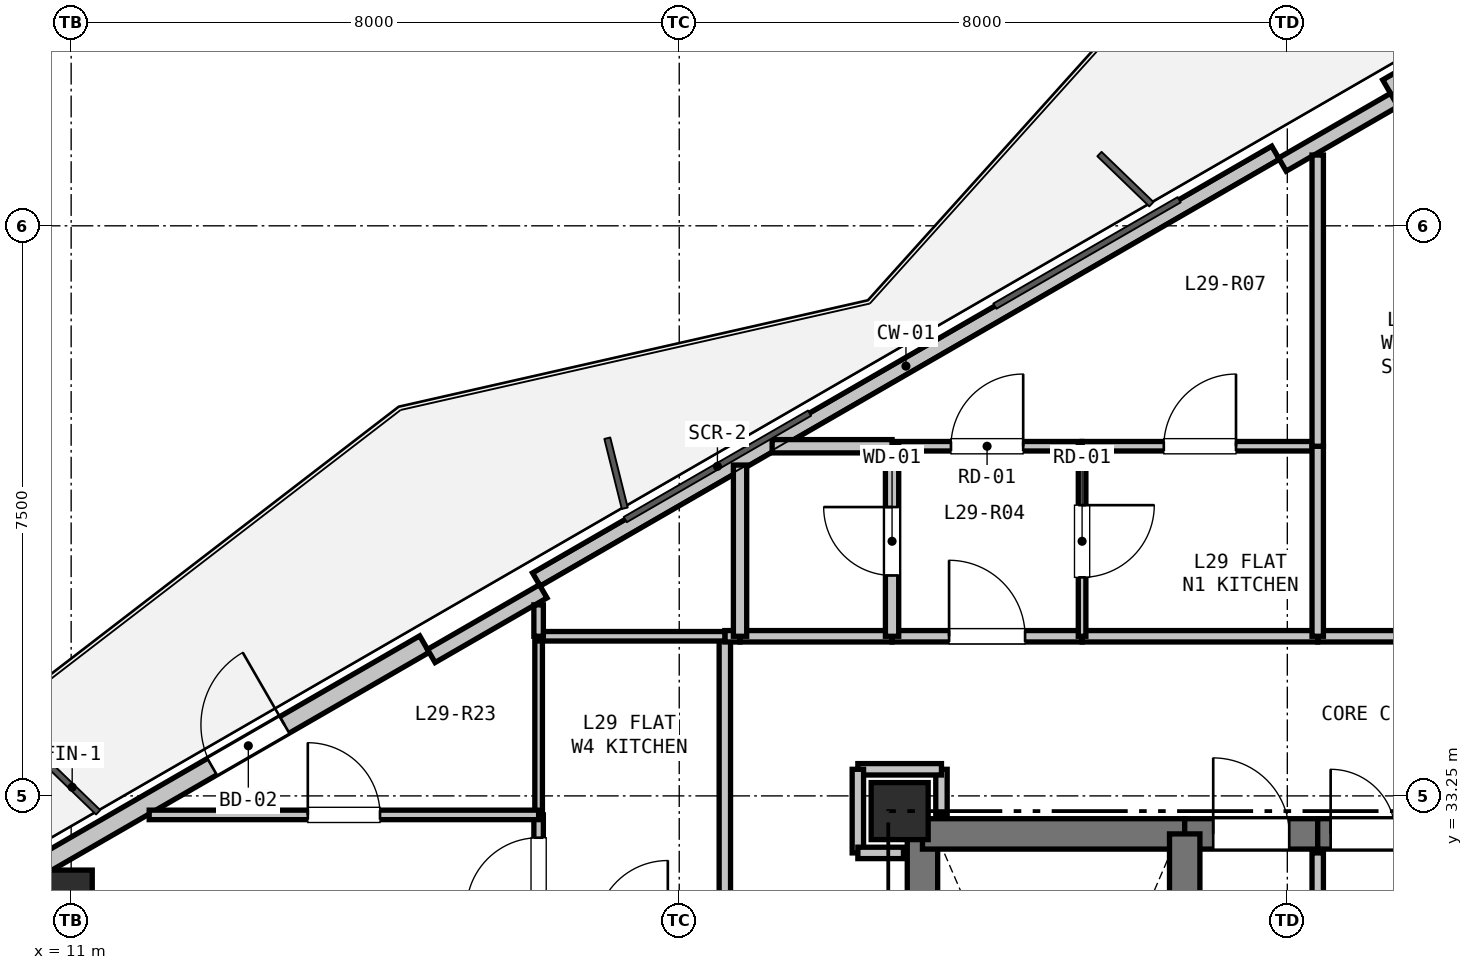
"""IFC4 building model, lengths in metres.
Left out: names, types, materials, properties, quantities, classifications, styles, units other than length and angle.
Written with IfcOpenShell. Run it as: python <this file> out.ifc"""

import sys

from ifc_helpers import new_model, si_unit, direction, frame, frame_2d, origin, origin_2d, place, context, subcontext, project, spatial, rectangle, hollow_rectangle, extrude, element, fill, save


model = new_model("IFC4")
c1 = context("Model", 3, precision=1e-05, world=origin(), true_north=direction((0.0, 1.0)))
c2 = subcontext(c1, "Body", "Model", "MODEL_VIEW")
j1 = project(units=[si_unit("LENGTHUNIT", "METRE"), si_unit("PLANEANGLEUNIT", "RADIAN")], contexts=[c1])
p1 = place(None, origin())
s1 = spatial("IfcSite", under=j1, at=p1, CompositionType="ELEMENT")
p2 = place(p1, origin())
s2 = spatial("IfcBuilding", under=s1, at=p2, CompositionType="ELEMENT")
p3 = place(p2, frame((0.0, 0.0, 106.5)))
s3 = spatial("IfcBuildingStorey", under=s2, at=p3, CompositionType="ELEMENT", Elevation=106.5)
p4 = place(p3, frame((21.9, 33.05, 0.0), z_axis=(0.0, 0.0, 1.0), x_axis=(1.0, 0.0, 0.0)))
e1 = element("IfcColumn", 1, at=p4, inside=s3, PredefinedType="COLUMN", context=c2, shape_type="SweptSolid", body=[
    extrude(rectangle(XDim=0.75, YDim=0.75, at=origin_2d()), origin(), (0.0, 0.0, 1.0), 3.3),
])
p5 = place(p3, frame((10.702, 31.699, 0.0), z_axis=(0.0, 0.0, 1.0), x_axis=(1.0, 0.0, 0.0)))
e2 = element("IfcColumn", 2, at=p5, inside=s3, PredefinedType="COLUMN", context=c2, shape_type="SweptSolid", body=[
    extrude(hollow_rectangle(XDim=1.15, YDim=1.15, WallThickness=0.032, at=origin_2d()), origin(), (0.0, 0.0, 1.0), 3.3),
])
p6 = place(p3, frame((5.317, 29.282, 0.0), z_axis=(0.0, 0.0, 1.0), x_axis=(0.866023023012, 0.500004123596, 0.0)))
e3 = element("IfcWall", 3, at=p6, inside=s3, PredefinedType="SOLIDWALL", context=c2, shape_type="SweptSolid", body=[
    extrude(rectangle(XDim=11.93, YDim=0.25, at=frame_2d((5.965, 0.0))), origin(), (0.0, 0.0, 1.0), 2.67),
])
p7 = place(p6, frame((8.704, 0.0, 0.0)))
e4 = element("IfcOpeningElement", 4, at=p7, cuts=e3, PredefinedType="OPENING", context=c2, shape_type="SweptSolid", body=[
    extrude(rectangle(XDim=1.1, YDim=2.1, at=frame_2d((0.55, 1.05))), frame((0.0, 0.135, 0.0), z_axis=(0.0, -1.0, 0.0), x_axis=(1.0, 0.0, 0.0)), (0.0, 0.0, 1.0), 0.27),
])
p8 = place(p3, frame((17.12, 36.097, 0.0), z_axis=(0.0, 0.0, 1.0), x_axis=(0.866027010039, 0.499997217876, 0.0)))
e5 = element("IfcWall", 5, at=p8, inside=s3, PredefinedType="PARAPET", context=c2, shape_type="SweptSolid", body=[
    extrude(rectangle(XDim=11.229, YDim=0.2, at=frame_2d((5.615, 0.0))), origin(), (0.0, 0.0, 1.0), 0.2),
])
p9 = place(p3, frame((28.317, 42.562, 0.0), z_axis=(0.0, 0.0, 1.0), x_axis=(0.866023023012, 0.500004123596, 0.0)))
e6 = element("IfcWall", 6, at=p9, inside=s3, PredefinedType="SOLIDWALL", context=c2, shape_type="SweptSolid", body=[
    extrude(rectangle(XDim=11.93, YDim=0.25, at=frame_2d((5.965, 0.0))), origin(), (0.0, 0.0, 1.0), 2.67),
])
p10 = place(p9, frame((6.718, 0.0, 0.9)))
e7 = element("IfcOpeningElement", 7, at=p10, cuts=e6, PredefinedType="OPENING", context=c2, shape_type="SweptSolid", body=[
    extrude(rectangle(XDim=1.2, YDim=1.4, at=frame_2d((0.6, 0.7))), frame((0.0, 0.135, 0.0), z_axis=(0.0, -1.0, 0.0), x_axis=(1.0, 0.0, 0.0)), (0.0, 0.0, 1.0), 0.27),
])
p11 = place(p3, frame((15.738, 35.091, 0.0), z_axis=(0.0, 0.0, 1.0), x_axis=(0.866025371046, 0.500000056704, 0.0)))
e8 = element("IfcWall", 8, at=p11, inside=s3, PredefinedType="PARAPET", context=c2, shape_type="SweptSolid", body=[
    extrude(rectangle(XDim=1.7, YDim=0.2, at=frame_2d((0.85, 0.0))), origin(), (0.0, 0.0, 1.0), 2.67),
])
p12 = place(p3, frame((26.935, 41.556, 0.0), z_axis=(0.0, 0.0, 1.0), x_axis=(0.86605165483, 0.499954529098, 0.0)))
e9 = element("IfcWall", 9, at=p12, inside=s3, PredefinedType="PARAPET", context=c2, shape_type="SweptSolid", body=[
    extrude(rectangle(XDim=1.7, YDim=0.2, at=frame_2d((0.85, 0.0))), origin(), (0.0, 0.0, 1.0), 2.67),
])
p13 = place(p3, frame((22.2, 25.4, 0.0), z_axis=(0.0, 0.0, 1.0), x_axis=(0.0, 1.0, 0.0)))
e10 = element("IfcWall", 10, at=p13, inside=s3, PredefinedType="SHEAR", context=c2, shape_type="SweptSolid", body=[
    extrude(rectangle(XDim=7.35, YDim=0.4, at=frame_2d((3.675, 0.0))), origin(), (0.0, 0.0, 1.0), 3.05),
])
p14 = place(p3, frame((22.2, 32.75, 0.0), z_axis=(0.0, 0.0, 1.0), x_axis=(1.0, 0.0, 0.0)))
e11 = element("IfcWall", 11, at=p14, inside=s3, PredefinedType="SHEAR", context=c2, shape_type="SweptSolid", body=[
    extrude(rectangle(XDim=3.45, YDim=0.4, at=frame_2d((1.725, 0.0))), origin(), (0.0, 0.0, 1.0), 3.05),
])
p15 = place(p3, frame((25.65, 32.75, 0.0), z_axis=(0.0, 0.0, 1.0), x_axis=(1.0, 0.0, 0.0)))
e12 = element("IfcWall", 12, at=p15, inside=s3, PredefinedType="SHEAR", context=c2, shape_type="SweptSolid", body=[
    extrude(rectangle(XDim=1.75, YDim=0.4, at=frame_2d((0.875, 0.0))), origin(), (0.0, 0.0, 1.0), 3.05),
])
p16 = place(p15, frame((0.375, 0.0, 0.0)))
e13 = element("IfcOpeningElement", 13, at=p16, cuts=e12, PredefinedType="OPENING", context=c2, shape_type="SweptSolid", body=[
    extrude(rectangle(XDim=1.0, YDim=2.15, at=frame_2d((0.5, 1.075))), frame((0.0, 0.21, 0.0), z_axis=(0.0, -1.0, 0.0), x_axis=(1.0, 0.0, 0.0)), (0.0, 0.0, 1.0), 0.42),
])
p17 = place(p3, frame((27.4, 32.75, 0.0), z_axis=(0.0, 0.0, 1.0), x_axis=(1.0, 0.0, 0.0)))
e14 = element("IfcWall", 14, at=p17, inside=s3, PredefinedType="SHEAR", context=c2, shape_type="SweptSolid", body=[
    extrude(rectangle(XDim=2.25, YDim=0.4, at=frame_2d((1.125, 0.0))), origin(), (0.0, 0.0, 1.0), 3.05),
])
p18 = place(p17, frame((0.17, 0.0, 0.0)))
e15 = element("IfcOpeningElement", 15, at=p18, cuts=e14, PredefinedType="OPENING", context=c2, shape_type="SweptSolid", body=[
    extrude(rectangle(XDim=0.85, YDim=2.1, at=frame_2d((0.425, 1.05))), frame((0.0, 0.21, 0.0), z_axis=(0.0, -1.0, 0.0), x_axis=(1.0, 0.0, 0.0)), (0.0, 0.0, 1.0), 0.42),
])
p19 = place(p17, frame((1.255, 0.0, 0.0)))
e16 = element("IfcOpeningElement", 16, at=p19, cuts=e14, PredefinedType="OPENING", context=c2, shape_type="SweptSolid", body=[
    extrude(rectangle(XDim=0.85, YDim=2.1, at=frame_2d((0.425, 1.05))), frame((0.0, 0.21, 0.0), z_axis=(0.0, -1.0, 0.0), x_axis=(1.0, 0.0, 0.0)), (0.0, 0.0, 1.0), 0.42),
])
p20 = place(p3, frame((25.65, 27.95, 0.0), z_axis=(0.0, 0.0, 1.0), x_axis=(0.0, 1.0, 0.0)))
e17 = element("IfcWall", 17, at=p20, inside=s3, PredefinedType="SHEAR", context=c2, shape_type="SweptSolid", body=[
    extrude(rectangle(XDim=4.8, YDim=0.4, at=frame_2d((2.4, 0.0))), origin(), (0.0, 0.0, 1.0), 3.05),
])
p21 = place(p3, frame((27.4, 32.5, 0.0), z_axis=(0.0, 0.0, 1.0), x_axis=(0.0, -1.0, 0.0)))
e18 = element("IfcWall", 18, at=p21, inside=s3, PredefinedType="PARTITIONING", context=c2, shape_type="SweptSolid", body=[
    extrude(rectangle(XDim=2.2, YDim=0.15, at=frame_2d((1.1, 0.0))), origin(), (0.0, 0.0, 1.0), 3.05),
])
p22 = place(p21, frame((0.675, 0.0, 0.0)))
e19 = element("IfcOpeningElement", 19, at=p22, cuts=e18, PredefinedType="OPENING", context=c2, shape_type="SweptSolid", body=[
    extrude(rectangle(XDim=0.85, YDim=2.1, at=frame_2d((0.425, 1.05))), frame((0.0, 0.085, 0.0), z_axis=(0.0, -1.0, 0.0), x_axis=(1.0, 0.0, 0.0)), (0.0, 0.0, 1.0), 0.17),
])
p23 = place(p3, frame((19.6, 31.45, 0.0), z_axis=(0.0, 0.0, 1.0), x_axis=(0.0, 1.0, 0.0)))
e20 = element("IfcWall", 20, at=p23, inside=s3, PredefinedType="PARTITIONING", context=c2, shape_type="SweptSolid", body=[
    extrude(rectangle(XDim=3.9, YDim=0.15, at=frame_2d((1.95, 0.0))), origin(), (0.0, 0.0, 1.0), 2.423),
])
p24 = place(p3, frame((19.6, 35.35, 0.0), z_axis=(0.0, 0.0, 1.0), x_axis=(1.0, 0.0, 0.0)))
e21 = element("IfcWall", 21, at=p24, inside=s3, PredefinedType="PARTITIONING", context=c2, shape_type="SweptSolid", body=[
    extrude(rectangle(XDim=0.2, YDim=0.15, at=frame_2d((0.1, 0.0))), origin(), (0.0, 0.0, 1.0), 3.05),
])
p25 = place(p3, frame((19.8, 35.35, 0.0), z_axis=(0.0, 0.0, 1.0), x_axis=(1.0, 0.0, 0.0)))
e22 = element("IfcWall", 22, at=p25, inside=s3, PredefinedType="PARTITIONING", context=c2, shape_type="SweptSolid", body=[
    extrude(rectangle(XDim=2.0, YDim=0.15, at=frame_2d((1.0, 0.0))), origin(), (0.0, 0.0, 1.0), 3.05),
])
p26 = place(p3, frame((21.8, 35.35, 0.0), z_axis=(0.0, 0.0, 1.0), x_axis=(1.0, 0.0, 0.0)))
e23 = element("IfcWall", 23, at=p26, inside=s3, PredefinedType="PARTITIONING", context=c2, shape_type="SweptSolid", body=[
    extrude(rectangle(XDim=2.5, YDim=0.15, at=frame_2d((1.25, 0.0))), origin(), (0.0, 0.0, 1.0), 3.05),
])
p27 = place(p26, frame((0.75, 0.0, 0.0)))
e24 = element("IfcOpeningElement", 24, at=p27, cuts=e23, PredefinedType="OPENING", context=c2, shape_type="SweptSolid", body=[
    extrude(rectangle(XDim=1.0, YDim=2.15, at=frame_2d((0.5, 1.075))), frame((0.0, 0.085, 0.0), z_axis=(0.0, -1.0, 0.0), x_axis=(1.0, 0.0, 0.0)), (0.0, 0.0, 1.0), 0.17),
])
p28 = place(p3, frame((24.3, 35.35, 0.0), z_axis=(0.0, 0.0, 1.0), x_axis=(1.0, 0.0, 0.0)))
e25 = element("IfcWall", 25, at=p28, inside=s3, PredefinedType="PARTITIONING", context=c2, shape_type="SweptSolid", body=[
    extrude(rectangle(XDim=3.1, YDim=0.15, at=frame_2d((1.55, 0.0))), origin(), (0.0, 0.0, 1.0), 3.05),
])
p29 = place(p3, frame((27.4, 35.35, 0.0), z_axis=(0.0, 0.0, 1.0), x_axis=(1.0, 0.0, 0.0)))
e26 = element("IfcWall", 26, at=p29, inside=s3, PredefinedType="PARTITIONING", context=c2, shape_type="SweptSolid", body=[
    extrude(rectangle(XDim=3.2, YDim=0.15, at=frame_2d((1.6, 0.0))), origin(), (0.0, 0.0, 1.0), 3.05),
])
p30 = place(p29, frame((1.1, 0.0, 0.0)))
e27 = element("IfcOpeningElement", 27, at=p30, cuts=e26, PredefinedType="OPENING", context=c2, shape_type="SweptSolid", body=[
    extrude(rectangle(XDim=1.0, YDim=2.15, at=frame_2d((0.5, 1.075))), frame((0.0, 0.085, 0.0), z_axis=(0.0, -1.0, 0.0), x_axis=(1.0, 0.0, 0.0)), (0.0, 0.0, 1.0), 0.17),
])
p31 = place(p3, frame((22.45, 33.0, 0.0), z_axis=(0.0, 0.0, 1.0), x_axis=(0.0, 1.0, 0.0)))
e28 = element("IfcWall", 28, at=p31, inside=s3, PredefinedType="PARTITIONING", context=c2, shape_type="SweptSolid", body=[
    extrude(rectangle(XDim=0.6, YDim=0.15, at=frame_2d((0.3, 0.0))), origin(), (0.0, 0.0, 1.0), 2.498),
])
p32 = place(p3, frame((22.45, 33.6, 0.0), z_axis=(0.0, 0.0, 1.0), x_axis=(-1.0, 0.0, 0.0)))
e29 = element("IfcWall", 29, at=p32, inside=s3, PredefinedType="PARTITIONING", context=c2, shape_type="SweptSolid", body=[
    extrude(rectangle(XDim=1.1, YDim=0.15, at=frame_2d((0.55, 0.0))), origin(), (0.0, 0.0, 1.0), 3.05),
])
p33 = place(p3, frame((21.35, 33.6, 0.0), z_axis=(0.0, 0.0, 1.0), x_axis=(0.0, -1.0, 0.0)))
e30 = element("IfcWall", 30, at=p33, inside=s3, PredefinedType="PARTITIONING", context=c2, shape_type="SweptSolid", body=[
    extrude(rectangle(XDim=1.1, YDim=0.15, at=frame_2d((0.55, 0.0))), origin(), (0.0, 0.0, 1.0), 2.423),
])
p34 = place(p3, frame((21.35, 32.5, 0.0), z_axis=(0.0, 0.0, 1.0), x_axis=(1.0, 0.0, 0.0)))
e31 = element("IfcWall", 31, at=p34, inside=s3, PredefinedType="PARTITIONING", context=c2, shape_type="SweptSolid", body=[
    extrude(rectangle(XDim=0.6, YDim=0.15, at=frame_2d((0.3, 0.0))), origin(), (0.0, 0.0, 1.0), 2.498),
])
p35 = place(p3, frame((21.8, 37.85, 0.0), z_axis=(0.0, 0.0, 1.0), x_axis=(1.0, 0.0, 0.0)))
e32 = element("IfcWall", 32, at=p35, inside=s3, PredefinedType="PARTITIONING", context=c2, shape_type="SweptSolid", body=[
    extrude(rectangle(XDim=2.5, YDim=0.125, at=frame_2d((1.25, 0.0))), origin(), (0.0, 0.0, 1.0), 3.05),
])
p36 = place(p35, frame((0.775, 0.0, 0.0)))
e33 = element("IfcOpeningElement", 33, at=p36, cuts=e32, PredefinedType="OPENING", context=c2, shape_type="SweptSolid", body=[
    extrude(rectangle(XDim=0.95, YDim=2.1, at=frame_2d((0.475, 1.05))), frame((0.0, 0.073, 0.0), z_axis=(0.0, -1.0, 0.0), x_axis=(1.0, 0.0, 0.0)), (0.0, 0.0, 1.0), 0.145),
])
p37 = place(p3, frame((24.3, 37.85, 0.0), z_axis=(0.0, 0.0, 1.0), x_axis=(0.0, -1.0, 0.0)))
e34 = element("IfcWall", 34, at=p37, inside=s3, PredefinedType="PARTITIONING", context=c2, shape_type="SweptSolid", body=[
    extrude(rectangle(XDim=2.5, YDim=0.1, at=frame_2d((1.25, 0.0))), origin(), (0.0, 0.0, 1.0), 3.05),
])
p38 = place(p37, frame((0.775, 0.0, 0.0)))
e35 = element("IfcOpeningElement", 35, at=p38, cuts=e34, PredefinedType="OPENING", context=c2, shape_type="SweptSolid", body=[
    extrude(rectangle(XDim=0.95, YDim=2.1, at=frame_2d((0.475, 1.05))), frame((0.0, 0.06, 0.0), z_axis=(0.0, -1.0, 0.0), x_axis=(1.0, 0.0, 0.0)), (0.0, 0.0, 1.0), 0.12),
])
p39 = place(p3, frame((21.8, 35.35, 0.0), z_axis=(0.0, 0.0, 1.0), x_axis=(0.0, 1.0, 0.0)))
e36 = element("IfcWall", 36, at=p39, inside=s3, PredefinedType="PLUMBINGWALL", context=c2, shape_type="SweptSolid", body=[
    extrude(rectangle(XDim=2.5, YDim=0.175, at=frame_2d((1.25, 0.0))), origin(), (0.0, 0.0, 1.0), 3.05),
])
p40 = place(p39, frame((0.8, 0.0, 0.0)))
e37 = element("IfcOpeningElement", 37, at=p40, cuts=e36, PredefinedType="OPENING", context=c2, shape_type="SweptSolid", body=[
    extrude(rectangle(XDim=0.9, YDim=2.1, at=frame_2d((0.45, 1.05))), frame((0.0, 0.097, 0.0), z_axis=(0.0, -1.0, 0.0), x_axis=(1.0, 0.0, 0.0)), (0.0, 0.0, 1.0), 0.195),
])
p41 = place(p3, frame((19.8, 35.35, 0.0), z_axis=(0.0, 0.0, 1.0), x_axis=(0.0, 1.0, 0.0)))
e38 = element("IfcWall", 38, at=p41, inside=s3, PredefinedType="PLUMBINGWALL", context=c2, shape_type="SweptSolid", body=[
    extrude(rectangle(XDim=2.252, YDim=0.175, at=frame_2d((1.126, 0.0))), origin(), (0.0, 0.0, 1.0), 2.365),
])
p42 = place(p3, frame((20.222, 37.85, 0.0), z_axis=(0.0, 0.0, 1.0), x_axis=(1.0, 0.0, 0.0)))
e39 = element("IfcWall", 39, at=p42, inside=s3, PredefinedType="PLUMBINGWALL", context=c2, shape_type="SweptSolid", body=[
    extrude(rectangle(XDim=1.578, YDim=0.175, at=frame_2d((0.789, 0.0))), origin(), (0.0, 0.0, 1.0), 2.365),
])
p43 = place(p3, frame((24.3, 37.85, 0.0), z_axis=(0.0, 0.0, 1.0), x_axis=(1.0, 0.0, 0.0)))
e40 = element("IfcWall", 40, at=p43, inside=s3, PredefinedType="PARTITIONING", context=c2, shape_type="SweptSolid", body=[
    extrude(rectangle(XDim=3.1, YDim=0.125, at=frame_2d((1.55, 0.0))), origin(), (0.0, 0.0, 1.0), 3.05),
])
p44 = place(p43, frame((1.075, 0.0, 0.0)))
e41 = element("IfcOpeningElement", 41, at=p44, cuts=e40, PredefinedType="OPENING", context=c2, shape_type="SweptSolid", body=[
    extrude(rectangle(XDim=0.95, YDim=2.1, at=frame_2d((0.475, 1.05))), frame((0.0, 0.073, 0.0), z_axis=(0.0, -1.0, 0.0), x_axis=(1.0, 0.0, 0.0)), (0.0, 0.0, 1.0), 0.145),
])
p45 = place(p3, frame((27.4, 37.85, 0.0), z_axis=(0.0, 0.0, 1.0), x_axis=(0.0, -1.0, 0.0)))
e42 = element("IfcWall", 42, at=p45, inside=s3, PredefinedType="PARTITIONING", context=c2, shape_type="SweptSolid", body=[
    extrude(rectangle(XDim=2.5, YDim=0.15, at=frame_2d((1.25, 0.0))), origin(), (0.0, 0.0, 1.0), 3.05),
])
p46 = place(p3, frame((17.15, 31.45, 0.0), z_axis=(0.0, 0.0, 1.0), x_axis=(0.0, 1.0, 0.0)))
e43 = element("IfcWall", 43, at=p46, inside=s3, PredefinedType="PARTITIONING", context=c2, shape_type="SweptSolid", body=[
    extrude(rectangle(XDim=1.55, YDim=0.125, at=frame_2d((0.775, 0.0))), origin(), (0.0, 0.0, 1.0), 2.423),
])
p47 = place(p46, frame((0.3, 0.0, 0.0)))
e44 = element("IfcOpeningElement", 44, at=p47, cuts=e43, PredefinedType="OPENING", context=c2, shape_type="SweptSolid", body=[
    extrude(rectangle(XDim=0.95, YDim=2.1, at=frame_2d((0.475, 1.05))), frame((0.0, 0.073, 0.0), z_axis=(0.0, -1.0, 0.0), x_axis=(1.0, 0.0, 0.0)), (0.0, 0.0, 1.0), 0.145),
])
p48 = place(p3, frame((17.15, 33.0, 0.0), z_axis=(0.0, 0.0, 1.0), x_axis=(0.0, 1.0, 0.0)))
e45 = element("IfcWall", 45, at=p48, inside=s3, PredefinedType="PARTITIONING", context=c2, shape_type="SweptSolid", body=[
    extrude(rectangle(XDim=2.35, YDim=0.1, at=frame_2d((1.175, 0.0))), origin(), (0.0, 0.0, 1.0), 2.365),
])
p49 = place(p3, frame((17.15, 35.35, 0.0), z_axis=(0.0, 0.0, 1.0), x_axis=(1.0, 0.0, 0.0)))
e46 = element("IfcWall", 46, at=p49, inside=s3, PredefinedType="PARTITIONING", context=c2, shape_type="SweptSolid", body=[
    extrude(rectangle(XDim=2.45, YDim=0.125, at=frame_2d((1.225, 0.0))), origin(), (0.0, 0.0, 1.0), 2.365),
])
p50 = place(p3, frame((27.4, 37.85, 0.0), z_axis=(0.0, 0.0, 1.0), x_axis=(0.0, 1.0, 0.0)))
e47 = element("IfcWall", 47, at=p50, inside=s3, PredefinedType="PARTITIONING", context=c2, shape_type="SweptSolid", body=[
    extrude(rectangle(XDim=3.831, YDim=0.15, at=frame_2d((1.916, 0.0))), origin(), (0.0, 0.0, 1.0), 2.365),
])
p51 = place(p3, frame((12.027, 33.0, 0.0), z_axis=(0.0, 0.0, 1.0), x_axis=(1.0, 0.0, 0.0)))
e48 = element("IfcWall", 48, at=p51, inside=s3, PredefinedType="PARTITIONING", context=c2, shape_type="SweptSolid", body=[
    extrude(rectangle(XDim=5.123, YDim=0.125, at=frame_2d((2.562, 0.0))), origin(), (0.0, 0.0, 1.0), 2.365),
])
p52 = place(p51, frame((2.086, 0.0, 0.0)))
e49 = element("IfcOpeningElement", 49, at=p52, cuts=e48, PredefinedType="OPENING", context=c2, shape_type="SweptSolid", body=[
    extrude(rectangle(XDim=0.95, YDim=2.1, at=frame_2d((0.475, 1.05))), frame((0.0, 0.073, 0.0), z_axis=(0.0, -1.0, 0.0), x_axis=(1.0, 0.0, 0.0)), (0.0, 0.0, 1.0), 0.145),
])
p53 = place(p3, frame((17.15, 35.763, 0.0), z_axis=(0.0, 0.0, 1.0), x_axis=(0.0, -1.0, 0.0)))
e50 = element("IfcWall", 50, at=p53, inside=s3, PredefinedType="PARTITIONING", context=c2, shape_type="SweptSolid", body=[
    extrude(rectangle(XDim=0.413, YDim=0.125, at=frame_2d((0.207, 0.0))), origin(), (0.0, 0.0, 1.0), 2.365),
])
p54 = place(p7, origin())
e51 = element("IfcDoor", 51, at=p54, inside=s3, OperationType="SINGLE_SWING_RIGHT", PredefinedType="DOOR", context=c2, shape_type="SweptSolid", body=[
    extrude(rectangle(XDim=1.1, YDim=2.1, at=frame_2d((0.55, 1.05))), frame((0.0, 0.025, 0.0), z_axis=(0.0, -1.0, 0.0), x_axis=(1.0, 0.0, 0.0)), (0.0, 0.0, 1.0), 0.05),
])
fill(e4, e51)
p55 = place(p16, origin())
e52 = element("IfcDoor", 52, at=p55, inside=s3, OperationType="SINGLE_SWING_LEFT", PredefinedType="DOOR", context=c2, shape_type="SweptSolid", body=[
    extrude(rectangle(XDim=1.0, YDim=2.15, at=frame_2d((0.5, 1.075))), frame((0.0, 0.025, 0.0), z_axis=(0.0, -1.0, 0.0), x_axis=(1.0, 0.0, 0.0)), (0.0, 0.0, 1.0), 0.05),
])
fill(e13, e52)
p56 = place(p27, origin())
e53 = element("IfcDoor", 53, at=p56, inside=s3, OperationType="SINGLE_SWING_LEFT", PredefinedType="DOOR", context=c2, shape_type="SweptSolid", body=[
    extrude(rectangle(XDim=1.0, YDim=2.15, at=frame_2d((0.5, 1.075))), frame((0.0, 0.025, 0.0), z_axis=(0.0, -1.0, 0.0), x_axis=(1.0, 0.0, 0.0)), (0.0, 0.0, 1.0), 0.05),
])
fill(e24, e53)
p57 = place(p18, origin())
e54 = element("IfcDoor", 54, at=p57, inside=s3, OperationType="SINGLE_SWING_LEFT", PredefinedType="DOOR", context=c2, shape_type="SweptSolid", body=[
    extrude(rectangle(XDim=0.85, YDim=2.1, at=frame_2d((0.425, 1.05))), frame((0.0, 0.025, 0.0), z_axis=(0.0, -1.0, 0.0), x_axis=(1.0, 0.0, 0.0)), (0.0, 0.0, 1.0), 0.05),
])
fill(e15, e54)
p58 = place(p40, origin())
e55 = element("IfcDoor", 55, at=p58, inside=s3, OperationType="SINGLE_SWING_RIGHT", PredefinedType="DOOR", context=c2, shape_type="SweptSolid", body=[
    extrude(rectangle(XDim=0.9, YDim=2.1, at=frame_2d((0.45, 1.05))), frame((0.0, 0.025, 0.0), z_axis=(0.0, -1.0, 0.0), x_axis=(1.0, 0.0, 0.0)), (0.0, 0.0, 1.0), 0.05),
])
fill(e37, e55)
p59 = place(p38, origin())
e56 = element("IfcDoor", 56, at=p59, inside=s3, OperationType="SINGLE_SWING_LEFT", PredefinedType="DOOR", context=c2, shape_type="SweptSolid", body=[
    extrude(rectangle(XDim=0.95, YDim=2.1, at=frame_2d((0.475, 1.05))), frame((0.0, 0.025, 0.0), z_axis=(0.0, -1.0, 0.0), x_axis=(1.0, 0.0, 0.0)), (0.0, 0.0, 1.0), 0.05),
])
fill(e35, e56)
p60 = place(p36, origin())
e57 = element("IfcDoor", 57, at=p60, inside=s3, OperationType="SINGLE_SWING_RIGHT", PredefinedType="DOOR", context=c2, shape_type="SweptSolid", body=[
    extrude(rectangle(XDim=0.95, YDim=2.1, at=frame_2d((0.475, 1.05))), frame((0.0, 0.025, 0.0), z_axis=(0.0, -1.0, 0.0), x_axis=(1.0, 0.0, 0.0)), (0.0, 0.0, 1.0), 0.05),
])
fill(e33, e57)
p61 = place(p44, origin())
e58 = element("IfcDoor", 58, at=p61, inside=s3, OperationType="SINGLE_SWING_RIGHT", PredefinedType="DOOR", context=c2, shape_type="SweptSolid", body=[
    extrude(rectangle(XDim=0.95, YDim=2.1, at=frame_2d((0.475, 1.05))), frame((0.0, 0.025, 0.0), z_axis=(0.0, -1.0, 0.0), x_axis=(1.0, 0.0, 0.0)), (0.0, 0.0, 1.0), 0.05),
])
fill(e41, e58)
p62 = place(p47, origin())
e59 = element("IfcDoor", 59, at=p62, inside=s3, OperationType="SINGLE_SWING_LEFT", PredefinedType="DOOR", context=c2, shape_type="SweptSolid", body=[
    extrude(rectangle(XDim=0.95, YDim=2.1, at=frame_2d((0.475, 1.05))), frame((0.0, 0.025, 0.0), z_axis=(0.0, -1.0, 0.0), x_axis=(1.0, 0.0, 0.0)), (0.0, 0.0, 1.0), 0.05),
])
fill(e44, e59)
p63 = place(p52, origin())
e60 = element("IfcDoor", 60, at=p63, inside=s3, OperationType="SINGLE_SWING_LEFT", PredefinedType="DOOR", context=c2, shape_type="SweptSolid", body=[
    extrude(rectangle(XDim=0.95, YDim=2.1, at=frame_2d((0.475, 1.05))), frame((0.0, 0.025, 0.0), z_axis=(0.0, -1.0, 0.0), x_axis=(1.0, 0.0, 0.0)), (0.0, 0.0, 1.0), 0.05),
])
fill(e49, e60)
save(model, sys.argv[1])
